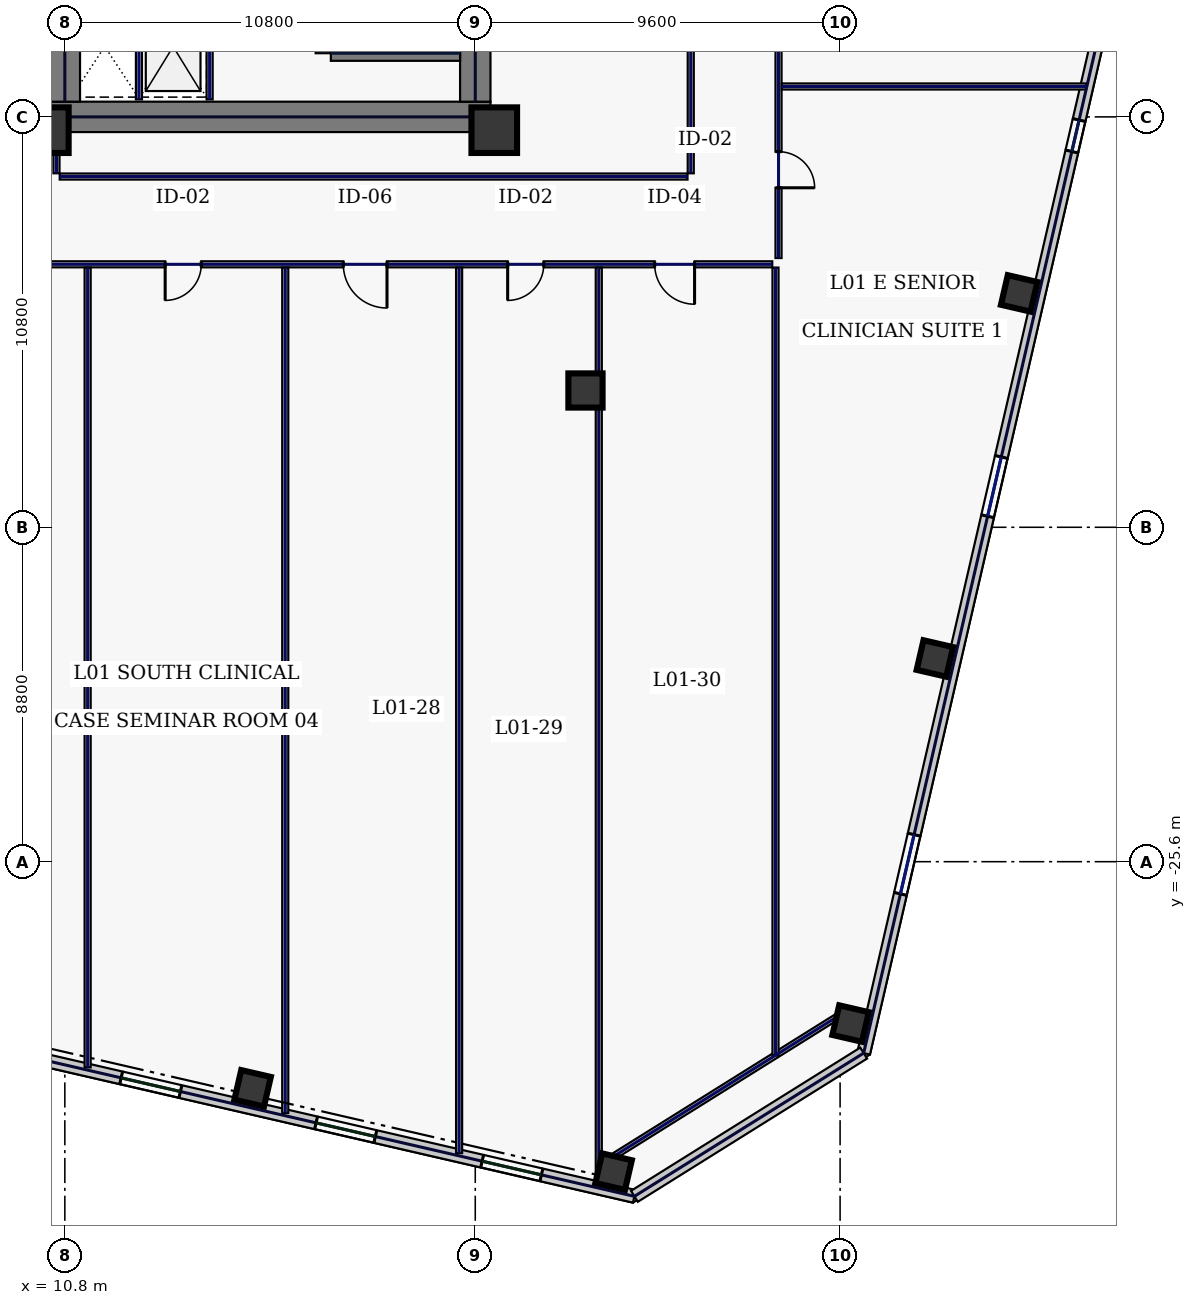
"""IFC4 building model, lengths in metres.
Left out: names, types, materials, properties, quantities, classifications, styles, units other than length and angle.
Written with IfcOpenShell. Run it as: python <this file> out.ifc"""

import sys

from ifc_helpers import new_model, si_unit, direction, frame, frame_2d, origin, origin_2d, place, context, subcontext, project, spatial, rectangle, hollow_rectangle, extrude, element, fill, save


model = new_model("IFC4")
c1 = context("Model", 3, precision=1e-05, world=origin(), true_north=direction((0.0, 1.0)))
c2 = subcontext(c1, "Body", "Model", "MODEL_VIEW")
j1 = project(units=[si_unit("LENGTHUNIT", "METRE"), si_unit("PLANEANGLEUNIT", "RADIAN")], contexts=[c1])
p1 = place(None, origin())
s1 = spatial("IfcSite", under=j1, at=p1, CompositionType="ELEMENT")
p2 = place(p1, origin())
s2 = spatial("IfcBuilding", under=s1, at=p2, CompositionType="ELEMENT")
p3 = place(p2, frame((0.0, 0.0, 8.4)))
s3 = spatial("IfcBuildingStorey", under=s2, at=p3, CompositionType="ELEMENT", Elevation=8.4)
p4 = place(p3, frame((10.4, -6.0, 0.0), z_axis=(0.0, 0.0, 1.0), x_axis=(1.0, 0.0, 0.0)))
e1 = element("IfcWall", 1, at=p4, inside=s3, PredefinedType="SHEAR", context=c2, shape_type="SweptSolid", body=[
    extrude(rectangle(XDim=11.6, YDim=0.8, at=frame_2d((5.8, 0.0))), origin(), (0.0, 0.0, 1.0), 4.7),
])
p5 = place(p3, frame((21.6, -5.6, 0.0), z_axis=(0.0, 0.0, 1.0), x_axis=(0.0, 1.0, 0.0)))
e2 = element("IfcWall", 2, at=p5, inside=s3, PredefinedType="SHEAR", context=c2, shape_type="SweptSolid", body=[
    extrude(rectangle(XDim=11.2, YDim=0.8, at=frame_2d((5.6, 0.0))), origin(), (0.0, 0.0, 1.0), 4.7),
])
p6 = place(p3, frame((10.8, -5.6, 0.0), z_axis=(0.0, 0.0, 1.0), x_axis=(0.0, 1.0, 0.0)))
e3 = element("IfcWall", 3, at=p6, inside=s3, PredefinedType="SHEAR", context=c2, shape_type="SweptSolid", body=[
    extrude(rectangle(XDim=2.95, YDim=0.8, at=frame_2d((1.475, 0.0))), origin(), (0.0, 0.0, 1.0), 4.7),
])
p7 = place(p3, frame((17.6, -4.325, 0.0), z_axis=(0.0, 0.0, 1.0), x_axis=(0.0, 1.0, 0.0)))
e4 = element("IfcWall", 4, at=p7, inside=s3, PredefinedType="SHEAR", context=c2, shape_type="SweptSolid", body=[
    extrude(rectangle(XDim=8.65, YDim=0.4, at=frame_2d((4.325, 0.0))), origin(), (0.0, 0.0, 1.0), 4.7),
])
p8 = place(p7, frame((0.25, 0.0, 0.0)))
e5 = element("IfcOpeningElement", 5, at=p8, cuts=e4, PredefinedType="OPENING", context=c2, shape_type="SweptSolid", body=[
    extrude(rectangle(XDim=1.1, YDim=2.2, at=frame_2d((0.55, 1.1))), frame((0.0, 0.21, 0.0), z_axis=(0.0, -1.0, 0.0), x_axis=(1.0, 0.0, 0.0)), (0.0, 0.0, 1.0), 0.42),
])
p9 = place(p3, frame((17.8, -4.325, 0.0), z_axis=(0.0, 0.0, 1.0), x_axis=(1.0, 0.0, 0.0)))
e6 = element("IfcWall", 6, at=p9, inside=s3, PredefinedType="SHEAR", context=c2, shape_type="SweptSolid", body=[
    extrude(rectangle(XDim=3.4, YDim=0.4, at=frame_2d((1.7, 0.0))), origin(), (0.0, 0.0, 1.0), 4.7),
])
for number, where, z_axis, x_axis in (
    (7, (10.3, -6.35, 0.0), (0.0, 0.0, 1.0), (1.0, 0.0, 0.0)),
    (8, (22.1, -6.35, 0.0), (0.0, 0.0, 1.0), (1.0, 0.0, 0.0)),
):
    element("IfcColumn", number, at=place(p3, frame(where, z_axis=z_axis, x_axis=x_axis)), inside=s3, PredefinedType="COLUMN", context=c2, shape_type="SweptSolid", body=[
        extrude(hollow_rectangle(XDim=1.2, YDim=1.2, WallThickness=0.05, at=origin_2d()), origin(), (0.0, 0.0, 1.0), 4.7),
    ])
p10 = place(p3, frame((24.5, -13.2, 0.0), z_axis=(0.0, 0.0, 1.0), x_axis=(1.0, 0.0, 0.0)))
e9 = element("IfcColumn", 9, at=p10, inside=s3, PredefinedType="COLUMN", context=c2, shape_type="SweptSolid", body=[
    extrude(hollow_rectangle(XDim=0.9, YDim=0.9, WallThickness=0.04, at=origin_2d()), origin(), (0.0, 0.0, 1.0), 4.7),
])
for number, where, z_axis, x_axis in (
    (10, (15.741, -31.564, 0.0), (0.0, 0.0, 1.0), (0.974, -0.225, 0.0)),
    (11, (25.24, -33.757, 0.0), (0.0, 0.0, 1.0), (0.974, -0.225, 0.0)),
    (12, (31.476, -29.86, 0.0), (0.0, 0.0, 1.0), (0.974, -0.225, 0.0)),
    (13, (33.694, -20.252, 0.0), (0.0, 0.0, 1.0), (0.974, -0.225, 0.0)),
    (14, (35.912, -10.645, 0.0), (0.0, 0.0, 1.0), (0.974, -0.225, 0.0)),
):
    element("IfcColumn", number, at=place(p3, frame(where, z_axis=z_axis, x_axis=x_axis)), inside=s3, PredefinedType="COLUMN", context=c2, shape_type="SweptSolid", body=[
        extrude(hollow_rectangle(XDim=0.8, YDim=0.8, WallThickness=0.036, at=origin_2d()), origin(), (0.0, 0.0, 1.0), 4.7),
    ])
p11 = place(p3, frame((3.717, -29.311, 0.0), z_axis=(0.0, 0.0, 1.0), x_axis=(0.97436993772, -0.224951604723, 0.0)))
e15 = element("IfcWall", 15, at=p11, inside=s3, PredefinedType="STANDARD", context=c2, shape_type="SweptSolid", body=[
    extrude(rectangle(XDim=22.651, YDim=0.34, at=frame_2d((11.326, 0.0))), origin(), (0.0, 0.0, 1.0), 4.7),
])
p12 = place(p11, frame((3.656, 0.0, 0.85)))
e16 = element("IfcOpeningElement", 16, at=p12, cuts=e15, PredefinedType="OPENING", context=c2, shape_type="SweptSolid", body=[
    extrude(rectangle(XDim=2.9, YDim=2.3, at=frame_2d((1.45, 1.15))), frame((0.0, 0.18, 0.0), z_axis=(0.0, -1.0, 0.0), x_axis=(1.0, 0.0, 0.0)), (0.0, 0.0, 1.0), 0.36),
])
p13 = place(p11, frame((8.791, 0.0, 0.22)))
e17 = element("IfcOpeningElement", 17, at=p13, cuts=e15, PredefinedType="OPENING", context=c2, shape_type="SweptSolid", body=[
    extrude(rectangle(XDim=1.6, YDim=1.2, at=frame_2d((0.8, 0.6))), frame((0.0, 0.18, 0.0), z_axis=(0.0, -1.0, 0.0), x_axis=(1.0, 0.0, 0.0)), (0.0, 0.0, 1.0), 0.36),
])
p14 = place(p11, frame((14.055, 0.0, 0.22)))
e18 = element("IfcOpeningElement", 18, at=p14, cuts=e15, PredefinedType="OPENING", context=c2, shape_type="SweptSolid", body=[
    extrude(rectangle(XDim=1.6, YDim=1.2, at=frame_2d((0.8, 0.6))), frame((0.0, 0.18, 0.0), z_axis=(0.0, -1.0, 0.0), x_axis=(1.0, 0.0, 0.0)), (0.0, 0.0, 1.0), 0.36),
])
p15 = place(p11, frame((18.539, 0.0, 0.22)))
e19 = element("IfcOpeningElement", 19, at=p15, cuts=e15, PredefinedType="OPENING", context=c2, shape_type="SweptSolid", body=[
    extrude(rectangle(XDim=1.6, YDim=1.2, at=frame_2d((0.8, 0.6))), frame((0.0, 0.18, 0.0), z_axis=(0.0, -1.0, 0.0), x_axis=(1.0, 0.0, 0.0)), (0.0, 0.0, 1.0), 0.36),
])
p16 = place(p3, frame((31.82, -30.637, 0.0), z_axis=(0.0, 0.0, 1.0), x_axis=(0.224949969076, 0.974370315338, 0.0)))
e20 = element("IfcWall", 20, at=p16, inside=s3, PredefinedType="STANDARD", context=c2, shape_type="SweptSolid", body=[
    extrude(rectangle(XDim=40.8, YDim=0.34, at=frame_2d((20.4, 0.0))), origin(), (0.0, 0.0, 1.0), 4.7),
])
p17 = place(p16, frame((4.3, 0.0, 0.58)))
e21 = element("IfcOpeningElement", 21, at=p17, cuts=e20, PredefinedType="OPENING", context=c2, shape_type="SweptSolid", body=[
    extrude(rectangle(XDim=1.6, YDim=2.3, at=frame_2d((0.8, 1.15))), frame((0.0, 0.18, 0.0), z_axis=(0.0, -1.0, 0.0), x_axis=(1.0, 0.0, 0.0)), (0.0, 0.0, 1.0), 0.36),
])
p18 = place(p16, frame((14.5, 0.0, 0.58)))
e22 = element("IfcOpeningElement", 22, at=p18, cuts=e20, PredefinedType="OPENING", context=c2, shape_type="SweptSolid", body=[
    extrude(rectangle(XDim=1.6, YDim=2.3, at=frame_2d((0.8, 1.15))), frame((0.0, 0.18, 0.0), z_axis=(0.0, -1.0, 0.0), x_axis=(1.0, 0.0, 0.0)), (0.0, 0.0, 1.0), 0.36),
])
p19 = place(p16, frame((24.35, 0.0, 0.75)))
e23 = element("IfcOpeningElement", 23, at=p19, cuts=e20, PredefinedType="OPENING", context=c2, shape_type="SweptSolid", body=[
    extrude(rectangle(XDim=0.85, YDim=1.85, at=frame_2d((0.425, 0.925))), frame((0.0, 0.18, 0.0), z_axis=(0.0, -1.0, 0.0), x_axis=(1.0, 0.0, 0.0)), (0.0, 0.0, 1.0), 0.36),
])
p20 = place(p16, frame((34.55, 0.0, 0.75)))
e24 = element("IfcOpeningElement", 24, at=p20, cuts=e20, PredefinedType="OPENING", context=c2, shape_type="SweptSolid", body=[
    extrude(rectangle(XDim=0.85, YDim=1.85, at=frame_2d((0.425, 0.925))), frame((0.0, 0.18, 0.0), z_axis=(0.0, -1.0, 0.0), x_axis=(1.0, 0.0, 0.0)), (0.0, 0.0, 1.0), 0.36),
])
p21 = place(p3, frame((25.788, -34.406, 0.0), z_axis=(0.0, 0.0, 1.0), x_axis=(0.848046504656, 0.529921811158, 0.0)))
e25 = element("IfcWall", 25, at=p21, inside=s3, PredefinedType="STANDARD", context=c2, shape_type="SweptSolid", body=[
    extrude(rectangle(XDim=7.113, YDim=0.34, at=frame_2d((3.557, 0.0))), origin(), (0.0, 0.0, 1.0), 4.7),
])
for number, where, z_axis, x_axis in (
    (26, (12.75, -5.54, 0.0), (0.0, 0.0, 1.0), (0.0, 1.0, 0.0)),
    (27, (14.61, -5.54, 0.0), (0.0, 0.0, 1.0), (0.0, 1.0, 0.0)),
):
    element("IfcWall", number, at=place(p3, frame(where, z_axis=z_axis, x_axis=x_axis)), inside=s3, PredefinedType="PARTITIONING", context=c2, shape_type="SweptSolid", body=[
        extrude(rectangle(XDim=2.7, YDim=0.16, at=frame_2d((1.35, 0.0))), origin(), (0.0, 0.0, 1.0), 4.7),
    ])
p22 = place(p3, frame((25.06, -33.468, 0.0), z_axis=(0.0, 0.0, 1.0), x_axis=(0.848043064089, 0.529927317139, 0.0)))
e28 = element("IfcWall", 28, at=p22, inside=s3, PredefinedType="PARTITIONING", context=c2, shape_type="SweptSolid", body=[
    extrude(rectangle(XDim=7.354, YDim=0.16, at=frame_2d((3.677, 0.0))), origin(), (0.0, 0.0, 1.0), 4.7),
])
p23 = place(p3, frame((29.58, 9.715, 0.0), z_axis=(0.0, 0.0, 1.0), x_axis=(0.0, -1.0, 0.0)))
e29 = element("IfcWall", 29, at=p23, inside=s3, PredefinedType="PARTITIONING", context=c2, shape_type="SweptSolid", body=[
    extrude(rectangle(XDim=19.43, YDim=0.16, at=frame_2d((9.715, 0.0))), origin(), (0.0, 0.0, 1.0), 4.7),
])
p24 = place(p23, frame((16.631, 0.0, 0.0)))
e30 = element("IfcOpeningElement", 30, at=p24, cuts=e29, PredefinedType="OPENING", context=c2, shape_type="SweptSolid", body=[
    extrude(rectangle(XDim=0.95, YDim=2.2, at=frame_2d((0.475, 1.1))), frame((0.0, 0.09, 0.0), z_axis=(0.0, -1.0, 0.0), x_axis=(1.0, 0.0, 0.0)), (0.0, 0.0, 1.0), 0.18),
])
p25 = place(p23, frame((12.55, 0.0, 0.0)))
e31 = element("IfcOpeningElement", 31, at=p25, cuts=e29, PredefinedType="OPENING", context=c2, shape_type="SweptSolid", body=[
    extrude(rectangle(XDim=0.95, YDim=2.2, at=frame_2d((0.475, 1.1))), frame((0.0, 0.09, 0.0), z_axis=(0.0, -1.0, 0.0), x_axis=(1.0, 0.0, 0.0)), (0.0, 0.0, 1.0), 0.18),
])
p26 = place(p23, frame((7.35, 0.0, 0.0)))
e32 = element("IfcOpeningElement", 32, at=p26, cuts=e29, PredefinedType="OPENING", context=c2, shape_type="SweptSolid", body=[
    extrude(rectangle(XDim=0.95, YDim=2.2, at=frame_2d((0.475, 1.1))), frame((0.0, 0.09, 0.0), z_axis=(0.0, -1.0, 0.0), x_axis=(1.0, 0.0, 0.0)), (0.0, 0.0, 1.0), 0.18),
])
p27 = place(p23, frame((2.019, 0.0, 0.0)))
e33 = element("IfcOpeningElement", 33, at=p27, cuts=e29, PredefinedType="OPENING", context=c2, shape_type="SweptSolid", body=[
    extrude(rectangle(XDim=0.95, YDim=2.2, at=frame_2d((0.475, 1.1))), frame((0.0, 0.09, 0.0), z_axis=(0.0, -1.0, 0.0), x_axis=(1.0, 0.0, 0.0)), (0.0, 0.0, 1.0), 0.18),
])
p28 = place(p3, frame((29.415, -9.88, 0.0), z_axis=(0.0, 0.0, 1.0), x_axis=(-1.0, 0.0, 0.0)))
e34 = element("IfcWall", 34, at=p28, inside=s3, PredefinedType="PARTITIONING", context=c2, shape_type="SweptSolid", body=[
    extrude(rectangle(XDim=22.5, YDim=0.16, at=frame_2d((11.25, 0.0))), origin(), (0.0, 0.0, 1.0), 4.7),
])
p29 = place(p28, frame((15.025, 0.0, 0.0)))
e35 = element("IfcOpeningElement", 35, at=p29, cuts=e34, PredefinedType="OPENING", context=c2, shape_type="SweptSolid", body=[
    extrude(rectangle(XDim=0.95, YDim=2.2, at=frame_2d((0.475, 1.1))), frame((0.0, 0.09, 0.0), z_axis=(0.0, -1.0, 0.0), x_axis=(1.0, 0.0, 0.0)), (0.0, 0.0, 1.0), 0.18),
])
p30 = place(p28, frame((10.137, 0.0, 0.0)))
e36 = element("IfcOpeningElement", 36, at=p30, cuts=e34, PredefinedType="OPENING", context=c2, shape_type="SweptSolid", body=[
    extrude(rectangle(XDim=1.15, YDim=2.2, at=frame_2d((0.575, 1.1))), frame((0.0, 0.09, 0.0), z_axis=(0.0, -1.0, 0.0), x_axis=(1.0, 0.0, 0.0)), (0.0, 0.0, 1.0), 0.18),
])
p31 = place(p28, frame((6.012, 0.0, 0.0)))
e37 = element("IfcOpeningElement", 37, at=p31, cuts=e34, PredefinedType="OPENING", context=c2, shape_type="SweptSolid", body=[
    extrude(rectangle(XDim=0.95, YDim=2.2, at=frame_2d((0.475, 1.1))), frame((0.0, 0.09, 0.0), z_axis=(0.0, -1.0, 0.0), x_axis=(1.0, 0.0, 0.0)), (0.0, 0.0, 1.0), 0.18),
])
p32 = place(p28, frame((2.044, 0.0, 0.0)))
e38 = element("IfcOpeningElement", 38, at=p32, cuts=e34, PredefinedType="OPENING", context=c2, shape_type="SweptSolid", body=[
    extrude(rectangle(XDim=1.05, YDim=2.2, at=frame_2d((0.525, 1.1))), frame((0.0, 0.09, 0.0), z_axis=(0.0, -1.0, 0.0), x_axis=(1.0, 0.0, 0.0)), (0.0, 0.0, 1.0), 0.18),
])
p33 = place(p3, frame((10.58, -6.42, 0.0), z_axis=(0.0, 0.0, 1.0), x_axis=(0.0, -1.0, 0.0)))
e39 = element("IfcWall", 39, at=p33, inside=s3, PredefinedType="PARTITIONING", context=c2, shape_type="SweptSolid", body=[
    extrude(rectangle(XDim=1.065, YDim=0.16, at=frame_2d((0.533, 0.0))), origin(), (0.0, 0.0, 1.0), 4.7),
])
p34 = place(p3, frame((10.665, -7.57, 0.0), z_axis=(0.0, 0.0, 1.0), x_axis=(1.0, 0.0, 0.0)))
e40 = element("IfcWall", 40, at=p34, inside=s3, PredefinedType="PARTITIONING", context=c2, shape_type="SweptSolid", body=[
    extrude(rectangle(XDim=16.52, YDim=0.16, at=frame_2d((8.26, 0.0))), origin(), (0.0, 0.0, 1.0), 4.7),
])
p35 = place(p3, frame((27.27, -7.485, 0.0), z_axis=(0.0, 0.0, 1.0), x_axis=(0.0, 1.0, 0.0)))
e41 = element("IfcWall", 41, at=p35, inside=s3, PredefinedType="PARTITIONING", context=c2, shape_type="SweptSolid", body=[
    extrude(rectangle(XDim=14.97, YDim=0.16, at=frame_2d((7.485, 0.0))), origin(), (0.0, 0.0, 1.0), 4.7),
])
p36 = place(p3, frame((29.5, -30.703, 0.0), z_axis=(0.0, 0.0, 1.0), x_axis=(0.0, 1.0, 0.0)))
e42 = element("IfcWall", 42, at=p36, inside=s3, PredefinedType="PARTITIONING", context=c2, shape_type="SweptSolid", body=[
    extrude(rectangle(XDim=20.738, YDim=0.16, at=frame_2d((10.369, 0.0))), origin(), (0.0, 0.0, 1.0), 4.7),
])
p37 = place(p3, frame((11.4, -31.013, 0.0), z_axis=(0.0, 0.0, 1.0), x_axis=(0.0, 1.0, 0.0)))
e43 = element("IfcWall", 43, at=p37, inside=s3, PredefinedType="PARTITIONING", context=c2, shape_type="SweptSolid", body=[
    extrude(rectangle(XDim=21.048, YDim=0.16, at=frame_2d((10.524, 0.0))), origin(), (0.0, 0.0, 1.0), 4.7),
])
p38 = place(p3, frame((16.6, -32.214, 0.0), z_axis=(0.0, 0.0, 1.0), x_axis=(0.0, 1.0, 0.0)))
e44 = element("IfcWall", 44, at=p38, inside=s3, PredefinedType="PARTITIONING", context=c2, shape_type="SweptSolid", body=[
    extrude(rectangle(XDim=22.249, YDim=0.16, at=frame_2d((11.124, 0.0))), origin(), (0.0, 0.0, 1.0), 4.7),
])
p39 = place(p3, frame((24.85, -34.118, 0.0), z_axis=(0.0, 0.0, 1.0), x_axis=(0.0, 1.0, 0.0)))
e45 = element("IfcWall", 45, at=p39, inside=s3, PredefinedType="PARTITIONING", context=c2, shape_type="SweptSolid", body=[
    extrude(rectangle(XDim=24.153, YDim=0.16, at=frame_2d((12.077, 0.0))), origin(), (0.0, 0.0, 1.0), 4.195),
])
p40 = place(p3, frame((21.175, -33.27, 0.0), z_axis=(0.0, 0.0, 1.0), x_axis=(0.0, 1.0, 0.0)))
e46 = element("IfcWall", 46, at=p40, inside=s3, PredefinedType="PARTITIONING", context=c2, shape_type="SweptSolid", body=[
    extrude(rectangle(XDim=23.305, YDim=0.16, at=frame_2d((11.652, 0.0))), origin(), (0.0, 0.0, 1.0), 4.7),
])
p41 = place(p3, frame((29.665, -5.2, 0.0), z_axis=(0.0, 0.0, 1.0), x_axis=(1.0, 0.0, 0.0)))
e47 = element("IfcWall", 47, at=p41, inside=s3, PredefinedType="PARTITIONING", context=c2, shape_type="SweptSolid", body=[
    extrude(rectangle(XDim=8.007, YDim=0.16, at=frame_2d((4.003, 0.0))), origin(), (0.0, 0.0, 1.0), 4.7),
])
p42 = place(p13, origin())
e48 = element("IfcWindow", 48, at=p42, inside=s3, PartitioningType="SINGLE_PANEL", PredefinedType="WINDOW", context=c2, shape_type="SweptSolid", body=[
    extrude(rectangle(XDim=1.6, YDim=1.2, at=frame_2d((0.8, 0.6))), frame((0.0, 0.03, 0.0), z_axis=(0.0, -1.0, 0.0), x_axis=(1.0, 0.0, 0.0)), (0.0, 0.0, 1.0), 0.06),
])
fill(e17, e48)
p43 = place(p14, origin())
e49 = element("IfcWindow", 49, at=p43, inside=s3, PartitioningType="SINGLE_PANEL", PredefinedType="WINDOW", context=c2, shape_type="SweptSolid", body=[
    extrude(rectangle(XDim=1.6, YDim=1.2, at=frame_2d((0.8, 0.6))), frame((0.0, 0.03, 0.0), z_axis=(0.0, -1.0, 0.0), x_axis=(1.0, 0.0, 0.0)), (0.0, 0.0, 1.0), 0.06),
])
fill(e18, e49)
p44 = place(p15, origin())
e50 = element("IfcWindow", 50, at=p44, inside=s3, PartitioningType="SINGLE_PANEL", PredefinedType="WINDOW", context=c2, shape_type="SweptSolid", body=[
    extrude(rectangle(XDim=1.6, YDim=1.2, at=frame_2d((0.8, 0.6))), frame((0.0, 0.03, 0.0), z_axis=(0.0, -1.0, 0.0), x_axis=(1.0, 0.0, 0.0)), (0.0, 0.0, 1.0), 0.06),
])
fill(e19, e50)
p45 = place(p17, origin())
e51 = element("IfcWindow", 51, at=p45, inside=s3, PartitioningType="SINGLE_PANEL", PredefinedType="WINDOW", context=c2, shape_type="SweptSolid", body=[
    extrude(rectangle(XDim=1.6, YDim=2.3, at=frame_2d((0.8, 1.15))), frame((0.0, 0.03, 0.0), z_axis=(0.0, -1.0, 0.0), x_axis=(1.0, 0.0, 0.0)), (0.0, 0.0, 1.0), 0.06),
])
fill(e21, e51)
p46 = place(p18, origin())
e52 = element("IfcWindow", 52, at=p46, inside=s3, PartitioningType="SINGLE_PANEL", PredefinedType="WINDOW", context=c2, shape_type="SweptSolid", body=[
    extrude(rectangle(XDim=1.6, YDim=2.3, at=frame_2d((0.8, 1.15))), frame((0.0, 0.03, 0.0), z_axis=(0.0, -1.0, 0.0), x_axis=(1.0, 0.0, 0.0)), (0.0, 0.0, 1.0), 0.06),
])
fill(e22, e52)
p47 = place(p19, origin())
e53 = element("IfcWindow", 53, at=p47, inside=s3, PartitioningType="SINGLE_PANEL", PredefinedType="WINDOW", context=c2, shape_type="SweptSolid", body=[
    extrude(rectangle(XDim=0.85, YDim=1.85, at=frame_2d((0.425, 0.925))), frame((0.0, 0.03, 0.0), z_axis=(0.0, -1.0, 0.0), x_axis=(1.0, 0.0, 0.0)), (0.0, 0.0, 1.0), 0.06),
])
fill(e23, e53)
p48 = place(p29, origin())
e54 = element("IfcDoor", 54, at=p48, inside=s3, OperationType="SINGLE_SWING_RIGHT", PredefinedType="DOOR", context=c2, shape_type="SweptSolid", body=[
    extrude(rectangle(XDim=0.95, YDim=2.2, at=frame_2d((0.475, 1.1))), frame((0.0, 0.025, 0.0), z_axis=(0.0, -1.0, 0.0), x_axis=(1.0, 0.0, 0.0)), (0.0, 0.0, 1.0), 0.05),
])
fill(e35, e54)
p49 = place(p30, origin())
e55 = element("IfcDoor", 55, at=p49, inside=s3, OperationType="SINGLE_SWING_LEFT", PredefinedType="DOOR", context=c2, shape_type="SweptSolid", body=[
    extrude(rectangle(XDim=1.15, YDim=2.2, at=frame_2d((0.575, 1.1))), frame((0.0, 0.025, 0.0), z_axis=(0.0, -1.0, 0.0), x_axis=(1.0, 0.0, 0.0)), (0.0, 0.0, 1.0), 0.05),
])
fill(e36, e55)
p50 = place(p31, origin())
e56 = element("IfcDoor", 56, at=p50, inside=s3, OperationType="SINGLE_SWING_RIGHT", PredefinedType="DOOR", context=c2, shape_type="SweptSolid", body=[
    extrude(rectangle(XDim=0.95, YDim=2.2, at=frame_2d((0.475, 1.1))), frame((0.0, 0.025, 0.0), z_axis=(0.0, -1.0, 0.0), x_axis=(1.0, 0.0, 0.0)), (0.0, 0.0, 1.0), 0.05),
])
fill(e37, e56)
p51 = place(p32, origin())
e57 = element("IfcDoor", 57, at=p51, inside=s3, OperationType="SINGLE_SWING_LEFT", PredefinedType="DOOR", context=c2, shape_type="SweptSolid", body=[
    extrude(rectangle(XDim=1.05, YDim=2.2, at=frame_2d((0.525, 1.1))), frame((0.0, 0.025, 0.0), z_axis=(0.0, -1.0, 0.0), x_axis=(1.0, 0.0, 0.0)), (0.0, 0.0, 1.0), 0.05),
])
fill(e38, e57)
p52 = place(p24, origin())
e58 = element("IfcDoor", 58, at=p52, inside=s3, OperationType="SINGLE_SWING_RIGHT", PredefinedType="DOOR", context=c2, shape_type="SweptSolid", body=[
    extrude(rectangle(XDim=0.95, YDim=2.2, at=frame_2d((0.475, 1.1))), frame((0.0, 0.025, 0.0), z_axis=(0.0, -1.0, 0.0), x_axis=(1.0, 0.0, 0.0)), (0.0, 0.0, 1.0), 0.05),
])
fill(e30, e58)
save(model, sys.argv[1])
